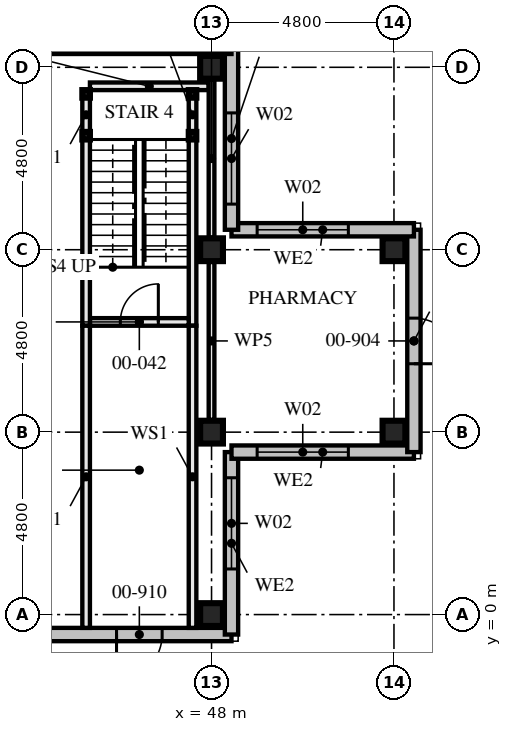
"""IFC4 building model, lengths in metres.
Left out: names, types, materials, properties, quantities, classifications, styles, units other than length and angle.
Written with IfcOpenShell. Run it as: python <this file> out.ifc"""

import sys

from ifc_helpers import new_model, si_unit, direction, frame, frame_2d, origin, origin_2d, place, context, subcontext, project, spatial, rectangle, hollow_rectangle, extrude, element, fill, save


model = new_model("IFC4")
c1 = context("Model", 3, precision=1e-05, world=origin(), true_north=direction((0.0, 1.0)))
c2 = subcontext(c1, "Body", "Model", "MODEL_VIEW")
j1 = project(units=[si_unit("LENGTHUNIT", "METRE"), si_unit("PLANEANGLEUNIT", "RADIAN")], contexts=[c1])
p1 = place(None, origin())
s1 = spatial("IfcSite", under=j1, at=p1, CompositionType="ELEMENT")
p2 = place(p1, origin())
s2 = spatial("IfcBuilding", under=s1, at=p2, CompositionType="ELEMENT")
p3 = place(p2, origin())
s3 = spatial("IfcBuildingStorey", under=s2, at=p3, CompositionType="ELEMENT", Elevation=0.0)
for number, where, z_axis, x_axis in (
    (1, (48.0, 0.0, 0.0), (0.0, 0.0, 1.0), (0.0, 1.0, 0.0)),
    (2, (48.0, 4.8, 0.0), (0.0, 0.0, 1.0), (0.0, 1.0, 0.0)),
    (3, (48.0, 9.6, 0.0), (0.0, 0.0, 1.0), (0.0, 1.0, 0.0)),
    (4, (48.0, 14.4, 0.0), (0.0, 0.0, 1.0), (0.0, 1.0, 0.0)),
    (5, (52.8, 4.8, 0.0), (0.0, 0.0, 1.0), (0.0, 1.0, 0.0)),
    (6, (52.8, 9.6, 0.0), (0.0, 0.0, 1.0), (0.0, 1.0, 0.0)),
):
    element("IfcColumn", number, at=place(p3, frame(where, z_axis=z_axis, x_axis=x_axis)), inside=s3, PredefinedType="COLUMN", context=c2, shape_type="SweptSolid", body=[
        extrude(hollow_rectangle(XDim=0.6, YDim=0.6, WallThickness=0.05, at=origin_2d()), origin(), (0.0, 0.0, 1.0), 4.5),
    ])
for number, where, z_axis, x_axis in (
    (7, (44.7, 13.7, 0.0), (0.0, 0.0, 1.0), (1.0, 0.0, 0.0)),
    (8, (47.5, 13.7, 0.0), (0.0, 0.0, 1.0), (1.0, 0.0, 0.0)),
    (9, (44.7, 12.6, 0.0), (0.0, 0.0, 1.0), (1.0, 0.0, 0.0)),
    (10, (47.5, 12.6, 0.0), (0.0, 0.0, 1.0), (1.0, 0.0, 0.0)),
):
    element("IfcColumn", number, at=place(p3, frame(where, z_axis=z_axis, x_axis=x_axis)), inside=s3, PredefinedType="COLUMN", context=c2, shape_type="SweptSolid", body=[
        extrude(hollow_rectangle(XDim=0.2, YDim=0.2, WallThickness=0.008, at=origin_2d()), origin(), (0.0, 0.0, 1.0), 4.33),
    ])
p4 = place(p3, frame((-5.325, -0.525, 0.0), z_axis=(0.0, 0.0, 1.0), x_axis=(1.0, 0.0, 0.0)))
e11 = element("IfcWall", 11, at=p4, inside=s3, PredefinedType="SOLIDWALL", context=c2, shape_type="SweptSolid", body=[
    extrude(rectangle(XDim=53.85, YDim=0.35, at=frame_2d((26.925, 0.0))), origin(), (0.0, 0.0, 1.0), 4.5),
])
p5 = place(p4, frame((25.925, 0.0, 0.0)))
e12 = element("IfcOpeningElement", 12, at=p5, cuts=e11, PredefinedType="OPENING", context=c2, shape_type="SweptSolid", body=[
    extrude(rectangle(XDim=2.0, YDim=2.7, at=frame_2d((1.0, 1.35))), frame((0.0, 0.186, 0.0), z_axis=(0.0, -1.0, 0.0), x_axis=(1.0, 0.0, 0.0)), (0.0, 0.0, 1.0), 0.371),
])
p6 = place(p4, frame((11.925, 0.0, 0.0)))
e13 = element("IfcOpeningElement", 13, at=p6, cuts=e11, PredefinedType="OPENING", context=c2, shape_type="SweptSolid", body=[
    extrude(rectangle(XDim=1.2, YDim=2.4, at=frame_2d((0.6, 1.2))), frame((0.0, 0.186, 0.0), z_axis=(0.0, -1.0, 0.0), x_axis=(1.0, 0.0, 0.0)), (0.0, 0.0, 1.0), 0.371),
])
p7 = place(p4, frame((40.725, 0.0, 0.0)))
e14 = element("IfcOpeningElement", 14, at=p7, cuts=e11, PredefinedType="OPENING", context=c2, shape_type="SweptSolid", body=[
    extrude(rectangle(XDim=1.2, YDim=2.4, at=frame_2d((0.6, 1.2))), frame((0.0, 0.186, 0.0), z_axis=(0.0, -1.0, 0.0), x_axis=(1.0, 0.0, 0.0)), (0.0, 0.0, 1.0), 0.371),
])
p8 = place(p4, frame((50.825, 0.0, 0.0)))
e15 = element("IfcOpeningElement", 15, at=p8, cuts=e11, PredefinedType="OPENING", context=c2, shape_type="SweptSolid", body=[
    extrude(rectangle(XDim=1.2, YDim=2.4, at=frame_2d((0.6, 1.2))), frame((0.0, 0.186, 0.0), z_axis=(0.0, -1.0, 0.0), x_axis=(1.0, 0.0, 0.0)), (0.0, 0.0, 1.0), 0.371),
])
p9 = place(p4, frame((1.725, 0.0, 0.9)))
e16 = element("IfcOpeningElement", 16, at=p9, cuts=e11, PredefinedType="OPENING", context=c2, shape_type="SweptSolid", body=[
    extrude(rectangle(XDim=2.4, YDim=2.4, at=frame_2d((1.2, 1.2))), frame((0.0, 0.186, 0.0), z_axis=(0.0, -1.0, 0.0), x_axis=(1.0, 0.0, 0.0)), (0.0, 0.0, 1.0), 0.371),
])
p10 = place(p4, frame((6.525, 0.0, 0.9)))
e17 = element("IfcOpeningElement", 17, at=p10, cuts=e11, PredefinedType="OPENING", context=c2, shape_type="SweptSolid", body=[
    extrude(rectangle(XDim=2.4, YDim=2.4, at=frame_2d((1.2, 1.2))), frame((0.0, 0.186, 0.0), z_axis=(0.0, -1.0, 0.0), x_axis=(1.0, 0.0, 0.0)), (0.0, 0.0, 1.0), 0.371),
])
p11 = place(p4, frame((16.125, 0.0, 0.9)))
e18 = element("IfcOpeningElement", 18, at=p11, cuts=e11, PredefinedType="OPENING", context=c2, shape_type="SweptSolid", body=[
    extrude(rectangle(XDim=2.4, YDim=2.4, at=frame_2d((1.2, 1.2))), frame((0.0, 0.186, 0.0), z_axis=(0.0, -1.0, 0.0), x_axis=(1.0, 0.0, 0.0)), (0.0, 0.0, 1.0), 0.371),
])
p12 = place(p4, frame((20.925, 0.0, 0.9)))
e19 = element("IfcOpeningElement", 19, at=p12, cuts=e11, PredefinedType="OPENING", context=c2, shape_type="SweptSolid", body=[
    extrude(rectangle(XDim=2.4, YDim=2.4, at=frame_2d((1.2, 1.2))), frame((0.0, 0.186, 0.0), z_axis=(0.0, -1.0, 0.0), x_axis=(1.0, 0.0, 0.0)), (0.0, 0.0, 1.0), 0.371),
])
p13 = place(p4, frame((30.525, 0.0, 0.9)))
e20 = element("IfcOpeningElement", 20, at=p13, cuts=e11, PredefinedType="OPENING", context=c2, shape_type="SweptSolid", body=[
    extrude(rectangle(XDim=2.4, YDim=2.4, at=frame_2d((1.2, 1.2))), frame((0.0, 0.186, 0.0), z_axis=(0.0, -1.0, 0.0), x_axis=(1.0, 0.0, 0.0)), (0.0, 0.0, 1.0), 0.371),
])
p14 = place(p4, frame((35.325, 0.0, 0.9)))
e21 = element("IfcOpeningElement", 21, at=p14, cuts=e11, PredefinedType="OPENING", context=c2, shape_type="SweptSolid", body=[
    extrude(rectangle(XDim=2.4, YDim=2.4, at=frame_2d((1.2, 1.2))), frame((0.0, 0.186, 0.0), z_axis=(0.0, -1.0, 0.0), x_axis=(1.0, 0.0, 0.0)), (0.0, 0.0, 1.0), 0.371),
])
p15 = place(p4, frame((44.925, 0.0, 0.9)))
e22 = element("IfcOpeningElement", 22, at=p15, cuts=e11, PredefinedType="OPENING", context=c2, shape_type="SweptSolid", body=[
    extrude(rectangle(XDim=2.4, YDim=2.4, at=frame_2d((1.2, 1.2))), frame((0.0, 0.186, 0.0), z_axis=(0.0, -1.0, 0.0), x_axis=(1.0, 0.0, 0.0)), (0.0, 0.0, 1.0), 0.371),
])
p16 = place(p3, frame((48.525, -0.525, 0.0), z_axis=(0.0, 0.0, 1.0), x_axis=(0.0, 1.0, 0.0)))
e23 = element("IfcWall", 23, at=p16, inside=s3, PredefinedType="SOLIDWALL", context=c2, shape_type="SweptSolid", body=[
    extrude(rectangle(XDim=4.8, YDim=0.35, at=frame_2d((2.4, 0.0))), origin(), (0.0, 0.0, 1.0), 4.5),
])
p17 = place(p16, frame((1.725, 0.0, 0.9)))
e24 = element("IfcOpeningElement", 24, at=p17, cuts=e23, PredefinedType="OPENING", context=c2, shape_type="SweptSolid", body=[
    extrude(rectangle(XDim=2.4, YDim=2.4, at=frame_2d((1.2, 1.2))), frame((0.0, 0.186, 0.0), z_axis=(0.0, -1.0, 0.0), x_axis=(1.0, 0.0, 0.0)), (0.0, 0.0, 1.0), 0.371),
])
p18 = place(p3, frame((48.525, 4.275, 0.0), z_axis=(0.0, 0.0, 1.0), x_axis=(1.0, 0.0, 0.0)))
e25 = element("IfcWall", 25, at=p18, inside=s3, PredefinedType="SOLIDWALL", context=c2, shape_type="SweptSolid", body=[
    extrude(rectangle(XDim=4.8, YDim=0.35, at=frame_2d((2.4, 0.0))), origin(), (0.0, 0.0, 1.0), 4.5),
])
p19 = place(p18, frame((0.675, 0.0, 0.9)))
e26 = element("IfcOpeningElement", 26, at=p19, cuts=e25, PredefinedType="OPENING", context=c2, shape_type="SweptSolid", body=[
    extrude(rectangle(XDim=2.4, YDim=2.4, at=frame_2d((1.2, 1.2))), frame((0.0, 0.186, 0.0), z_axis=(0.0, -1.0, 0.0), x_axis=(1.0, 0.0, 0.0)), (0.0, 0.0, 1.0), 0.371),
])
p20 = place(p3, frame((53.325, 4.275, 0.0), z_axis=(0.0, 0.0, 1.0), x_axis=(0.0, 1.0, 0.0)))
e27 = element("IfcWall", 27, at=p20, inside=s3, PredefinedType="SOLIDWALL", context=c2, shape_type="SweptSolid", body=[
    extrude(rectangle(XDim=5.85, YDim=0.35, at=frame_2d((2.925, 0.0))), origin(), (0.0, 0.0, 1.0), 4.5),
])
p21 = place(p20, frame((2.325, 0.0, 0.0)))
e28 = element("IfcOpeningElement", 28, at=p21, cuts=e27, PredefinedType="OPENING", context=c2, shape_type="SweptSolid", body=[
    extrude(rectangle(XDim=1.2, YDim=2.4, at=frame_2d((0.6, 1.2))), frame((0.0, 0.186, 0.0), z_axis=(0.0, -1.0, 0.0), x_axis=(1.0, 0.0, 0.0)), (0.0, 0.0, 1.0), 0.371),
])
p22 = place(p3, frame((53.325, 10.125, 0.0), z_axis=(0.0, 0.0, 1.0), x_axis=(-1.0, 0.0, 0.0)))
e29 = element("IfcWall", 29, at=p22, inside=s3, PredefinedType="SOLIDWALL", context=c2, shape_type="SweptSolid", body=[
    extrude(rectangle(XDim=4.8, YDim=0.35, at=frame_2d((2.4, 0.0))), origin(), (0.0, 0.0, 1.0), 4.5),
])
p23 = place(p22, frame((1.725, 0.0, 0.9)))
e30 = element("IfcOpeningElement", 30, at=p23, cuts=e29, PredefinedType="OPENING", context=c2, shape_type="SweptSolid", body=[
    extrude(rectangle(XDim=2.4, YDim=2.4, at=frame_2d((1.2, 1.2))), frame((0.0, 0.186, 0.0), z_axis=(0.0, -1.0, 0.0), x_axis=(1.0, 0.0, 0.0)), (0.0, 0.0, 1.0), 0.371),
])
p24 = place(p3, frame((48.525, 10.125, 0.0), z_axis=(0.0, 0.0, 1.0), x_axis=(0.0, 1.0, 0.0)))
e31 = element("IfcWall", 31, at=p24, inside=s3, PredefinedType="SOLIDWALL", context=c2, shape_type="SweptSolid", body=[
    extrude(rectangle(XDim=4.8, YDim=0.35, at=frame_2d((2.4, 0.0))), origin(), (0.0, 0.0, 1.0), 4.5),
])
p25 = place(p24, frame((0.675, 0.0, 0.9)))
e32 = element("IfcOpeningElement", 32, at=p25, cuts=e31, PredefinedType="OPENING", context=c2, shape_type="SweptSolid", body=[
    extrude(rectangle(XDim=2.4, YDim=2.4, at=frame_2d((1.2, 1.2))), frame((0.0, 0.186, 0.0), z_axis=(0.0, -1.0, 0.0), x_axis=(1.0, 0.0, 0.0)), (0.0, 0.0, 1.0), 0.371),
])
p26 = place(p3, frame((48.525, 14.925, 0.0), z_axis=(0.0, 0.0, 1.0), x_axis=(-1.0, 0.0, 0.0)))
e33 = element("IfcWall", 33, at=p26, inside=s3, PredefinedType="SOLIDWALL", context=c2, shape_type="SweptSolid", body=[
    extrude(rectangle(XDim=4.8, YDim=0.35, at=frame_2d((2.4, 0.0))), origin(), (0.0, 0.0, 1.0), 4.5),
])
p27 = place(p26, frame((1.725, 0.0, 0.9)))
e34 = element("IfcOpeningElement", 34, at=p27, cuts=e33, PredefinedType="OPENING", context=c2, shape_type="SweptSolid", body=[
    extrude(rectangle(XDim=2.4, YDim=2.4, at=frame_2d((1.2, 1.2))), frame((0.0, 0.186, 0.0), z_axis=(0.0, -1.0, 0.0), x_axis=(1.0, 0.0, 0.0)), (0.0, 0.0, 1.0), 0.371),
])
p28 = place(p3, frame((44.7, 13.6, 0.0), z_axis=(0.0, 0.0, 1.0), x_axis=(0.0, -1.0, 0.0)))
e35 = element("IfcWall", 35, at=p28, inside=s3, PredefinedType="SOLIDWALL", context=c2, shape_type="SweptSolid", body=[
    extrude(rectangle(XDim=0.9, YDim=0.2, at=frame_2d((0.45, 0.0))), origin(), (0.0, 0.0, 1.0), 3.99),
])
p29 = place(p3, frame((44.7, 12.5, 0.0), z_axis=(0.0, 0.0, 1.0), x_axis=(0.0, -1.0, 0.0)))
e36 = element("IfcWall", 36, at=p29, inside=s3, PredefinedType="SOLIDWALL", context=c2, shape_type="SweptSolid", body=[
    extrude(rectangle(XDim=4.9, YDim=0.2, at=frame_2d((2.45, 0.0))), origin(), (0.0, 0.0, 1.0), 3.99),
])
p30 = place(p3, frame((47.5, 13.6, 0.0), z_axis=(0.0, 0.0, 1.0), x_axis=(0.0, -1.0, 0.0)))
e37 = element("IfcWall", 37, at=p30, inside=s3, PredefinedType="SOLIDWALL", context=c2, shape_type="SweptSolid", body=[
    extrude(rectangle(XDim=0.9, YDim=0.2, at=frame_2d((0.45, 0.0))), origin(), (0.0, 0.0, 1.0), 3.99),
])
p31 = place(p3, frame((47.5, 12.5, 0.0), z_axis=(0.0, 0.0, 1.0), x_axis=(0.0, -1.0, 0.0)))
e38 = element("IfcWall", 38, at=p31, inside=s3, PredefinedType="SOLIDWALL", context=c2, shape_type="SweptSolid", body=[
    extrude(rectangle(XDim=4.9, YDim=0.2, at=frame_2d((2.45, 0.0))), origin(), (0.0, 0.0, 1.0), 3.99),
])
p32 = place(p3, frame((44.8, 13.9, 0.0), z_axis=(0.0, 0.0, 1.0), x_axis=(1.0, 0.0, 0.0)))
e39 = element("IfcWall", 39, at=p32, inside=s3, PredefinedType="SOLIDWALL", context=c2, shape_type="SweptSolid", body=[
    extrude(rectangle(XDim=3.125, YDim=0.2, at=frame_2d((1.562, 0.0))), origin(), (0.0, 0.0, 1.0), 4.33),
])
p33 = place(p3, frame((44.8, 7.7, 0.0), z_axis=(0.0, 0.0, 1.0), x_axis=(1.0, 0.0, 0.0)))
e40 = element("IfcWall", 40, at=p33, inside=s3, PredefinedType="SOLIDWALL", context=c2, shape_type="SweptSolid", body=[
    extrude(rectangle(XDim=2.6, YDim=0.2, at=frame_2d((1.3, 0.0))), origin(), (0.0, 0.0, 1.0), 4.33),
])
p34 = place(p33, frame((0.8, 0.0, 0.0)))
e41 = element("IfcOpeningElement", 41, at=p34, cuts=e40, PredefinedType="OPENING", context=c2, shape_type="SweptSolid", body=[
    extrude(rectangle(XDim=1.0, YDim=2.1, at=frame_2d((0.5, 1.05))), frame((0.0, 0.111, 0.0), z_axis=(0.0, -1.0, 0.0), x_axis=(1.0, 0.0, 0.0)), (0.0, 0.0, 1.0), 0.221),
])
for number, where, z_axis, x_axis in (
    (42, (44.7, 7.6, 0.0), (0.0, 0.0, 1.0), (0.0, -1.0, 0.0)),
    (43, (47.5, 7.6, 0.0), (0.0, 0.0, 1.0), (0.0, -1.0, 0.0)),
):
    element("IfcWall", number, at=place(p3, frame(where, z_axis=z_axis, x_axis=x_axis)), inside=s3, PredefinedType="SOLIDWALL", context=c2, shape_type="SweptSolid", body=[
        extrude(rectangle(XDim=7.95, YDim=0.2, at=frame_2d((3.975, 0.0))), origin(), (0.0, 0.0, 1.0), 3.32),
    ])
p35 = place(p3, frame((48.0, 5.12, 0.0), z_axis=(0.0, 0.0, 1.0), x_axis=(0.0, 1.0, 0.0)))
e44 = element("IfcWall", 44, at=p35, inside=s3, PredefinedType="PARTITIONING", context=c2, shape_type="SweptSolid", body=[
    extrude(rectangle(XDim=4.16, YDim=0.15, at=frame_2d((2.08, 0.0))), origin(), (0.0, 0.0, 1.0), 3.32),
])
p36 = place(p3, frame((48.0, 9.92, 0.0), z_axis=(0.0, 0.0, 1.0), x_axis=(0.0, 1.0, 0.0)))
e45 = element("IfcWall", 45, at=p36, inside=s3, PredefinedType="PARTITIONING", context=c2, shape_type="SweptSolid", body=[
    extrude(rectangle(XDim=4.16, YDim=0.15, at=frame_2d((2.08, 0.0))), origin(), (0.0, 0.0, 1.0), 3.32),
])
p37 = place(p8, frame((1.2, 0.0, 0.0), z_axis=(0.0, 0.0, 1.0), x_axis=(-1.0, 0.0, 0.0)))
e46 = element("IfcDoor", 46, at=p37, inside=s3, OperationType="SINGLE_SWING_LEFT", PredefinedType="DOOR", context=c2, shape_type="SweptSolid", body=[
    extrude(rectangle(XDim=1.2, YDim=2.4, at=frame_2d((0.6, 1.2))), frame((0.0, 0.027, 0.0), z_axis=(0.0, -1.0, 0.0), x_axis=(1.0, 0.0, 0.0)), (0.0, 0.0, 1.0), 0.054),
])
fill(e15, e46)
p38 = place(p17, origin())
e47 = element("IfcWindow", 47, at=p38, inside=s3, PartitioningType="SINGLE_PANEL", PredefinedType="WINDOW", context=c2, shape_type="SweptSolid", body=[
    extrude(rectangle(XDim=2.4, YDim=2.4, at=frame_2d((1.2, 1.2))), frame((0.0, 0.03, 0.0), z_axis=(0.0, -1.0, 0.0), x_axis=(1.0, 0.0, 0.0)), (0.0, 0.0, 1.0), 0.06),
])
fill(e24, e47)
p39 = place(p19, origin())
e48 = element("IfcWindow", 48, at=p39, inside=s3, PartitioningType="SINGLE_PANEL", PredefinedType="WINDOW", context=c2, shape_type="SweptSolid", body=[
    extrude(rectangle(XDim=2.4, YDim=2.4, at=frame_2d((1.2, 1.2))), frame((0.0, 0.03, 0.0), z_axis=(0.0, -1.0, 0.0), x_axis=(1.0, 0.0, 0.0)), (0.0, 0.0, 1.0), 0.06),
])
fill(e26, e48)
p40 = place(p21, frame((1.2, 0.0, 0.0), z_axis=(0.0, 0.0, 1.0), x_axis=(-1.0, 0.0, 0.0)))
e49 = element("IfcDoor", 49, at=p40, inside=s3, OperationType="SINGLE_SWING_LEFT", PredefinedType="DOOR", context=c2, shape_type="SweptSolid", body=[
    extrude(rectangle(XDim=1.2, YDim=2.4, at=frame_2d((0.6, 1.2))), frame((0.0, 0.027, 0.0), z_axis=(0.0, -1.0, 0.0), x_axis=(1.0, 0.0, 0.0)), (0.0, 0.0, 1.0), 0.054),
])
fill(e28, e49)
p41 = place(p23, origin())
e50 = element("IfcWindow", 50, at=p41, inside=s3, PartitioningType="SINGLE_PANEL", PredefinedType="WINDOW", context=c2, shape_type="SweptSolid", body=[
    extrude(rectangle(XDim=2.4, YDim=2.4, at=frame_2d((1.2, 1.2))), frame((0.0, 0.03, 0.0), z_axis=(0.0, -1.0, 0.0), x_axis=(1.0, 0.0, 0.0)), (0.0, 0.0, 1.0), 0.06),
])
fill(e30, e50)
p42 = place(p25, origin())
e51 = element("IfcWindow", 51, at=p42, inside=s3, PartitioningType="SINGLE_PANEL", PredefinedType="WINDOW", context=c2, shape_type="SweptSolid", body=[
    extrude(rectangle(XDim=2.4, YDim=2.4, at=frame_2d((1.2, 1.2))), frame((0.0, 0.03, 0.0), z_axis=(0.0, -1.0, 0.0), x_axis=(1.0, 0.0, 0.0)), (0.0, 0.0, 1.0), 0.06),
])
fill(e32, e51)
p43 = place(p34, origin())
e52 = element("IfcDoor", 52, at=p43, inside=s3, OperationType="SINGLE_SWING_LEFT", PredefinedType="DOOR", context=c2, shape_type="SweptSolid", body=[
    extrude(rectangle(XDim=1.0, YDim=2.1, at=frame_2d((0.5, 1.05))), frame((0.0, 0.032, 0.0), z_axis=(0.0, -1.0, 0.0), x_axis=(1.0, 0.0, 0.0)), (0.0, 0.0, 1.0), 0.064),
])
fill(e41, e52)
save(model, sys.argv[1])
